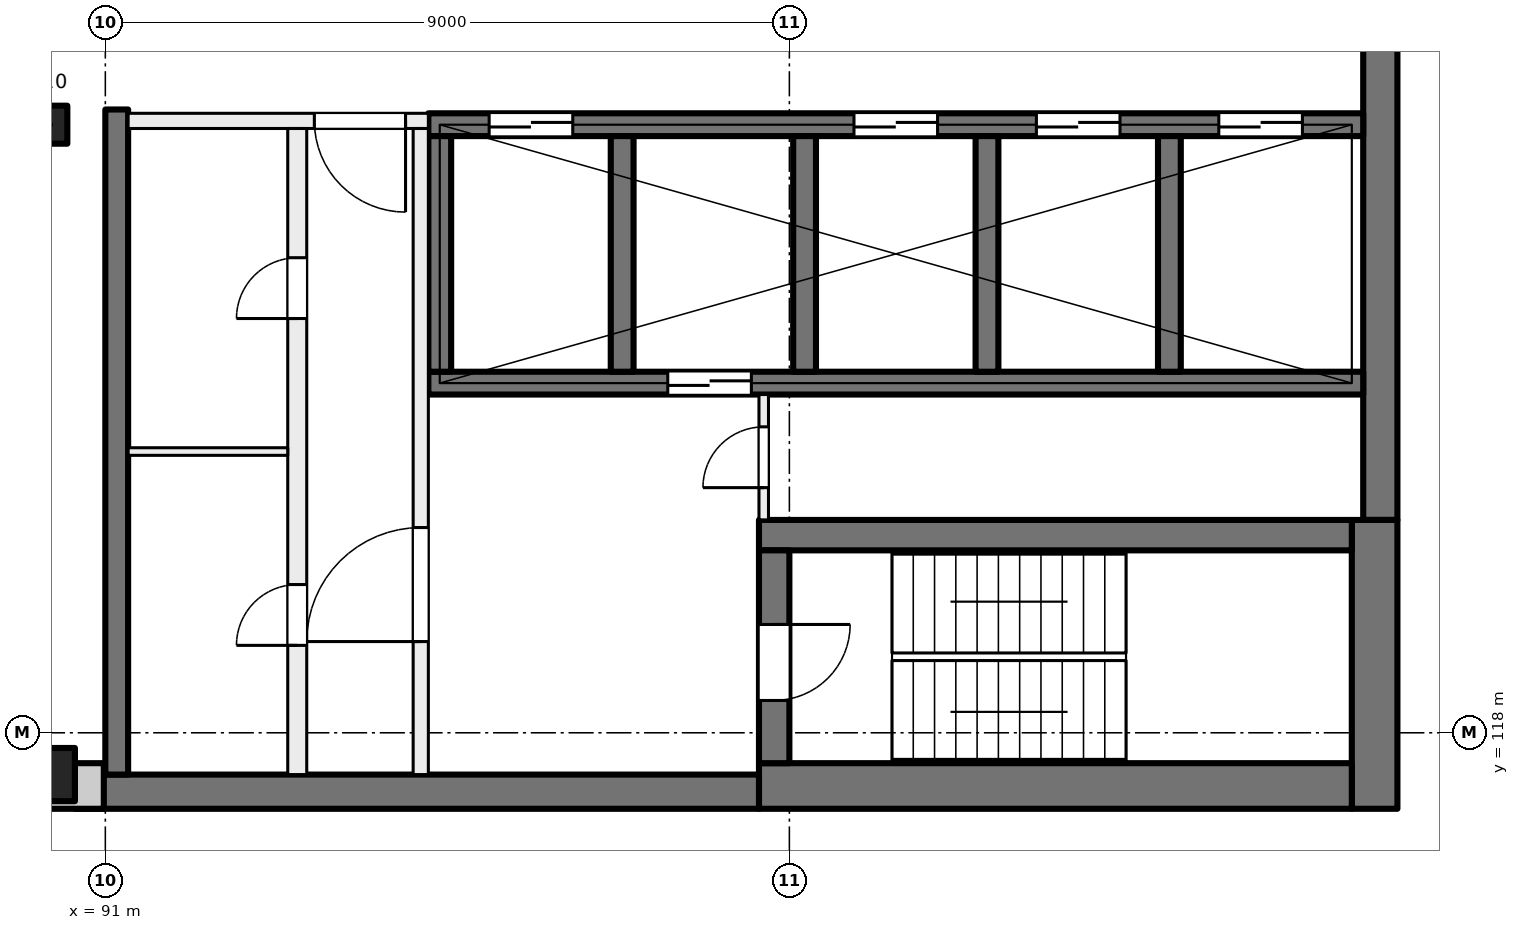
"""IFC4 building model, lengths in metres.
Left out: names, types, materials, properties, quantities, classifications, styles, units other than length and angle.
Written with IfcOpenShell. Run it as: python <this file> out.ifc"""

import sys

from ifc_helpers import new_model, si_unit, direction, frame, frame_2d, origin, origin_2d, place, context, subcontext, project, spatial, rectangle, extrude, element, fill, save


model = new_model("IFC4")
c1 = context("Model", 3, precision=1e-05, world=origin(), true_north=direction((0.0, 1.0)))
c2 = subcontext(c1, "Body", "Model", "MODEL_VIEW")
j1 = project(units=[si_unit("LENGTHUNIT", "METRE"), si_unit("PLANEANGLEUNIT", "RADIAN")], contexts=[c1])
p1 = place(None, origin())
s1 = spatial("IfcSite", under=j1, at=p1, CompositionType="ELEMENT")
p2 = place(p1, origin())
s2 = spatial("IfcBuilding", under=s1, at=p2, CompositionType="ELEMENT")
p3 = place(p2, frame((0.0, 0.0, 269.5)))
s3 = spatial("IfcBuildingStorey", under=s2, at=p3, CompositionType="ELEMENT", Elevation=269.5)
p4 = place(p3, frame((90.25, 126.0, 0.0), z_axis=(0.0, 0.0, 1.0), x_axis=(1.0, 0.0, 0.0)))
e1 = element("IfcColumn", 1, at=p4, inside=s3, PredefinedType="COLUMN", context=c2, shape_type="SweptSolid", body=[
    extrude(rectangle(XDim=0.5, YDim=0.5, at=origin_2d()), origin(), (0.0, 0.0, 1.0), 4.0),
])
p5 = place(p3, frame((90.25, 117.45, 0.0), z_axis=(0.0, 0.0, 1.0), x_axis=(1.0, 0.0, 0.0)))
e2 = element("IfcColumn", 2, at=p5, inside=s3, PredefinedType="COLUMN", context=c2, shape_type="SweptSolid", body=[
    extrude(rectangle(XDim=0.7, YDim=0.7, at=origin_2d()), origin(), (0.0, 0.0, 1.0), 4.0),
])
p6 = place(p3, frame((107.775, 135.2, 0.0), z_axis=(0.0, 0.0, 1.0), x_axis=(0.0, -1.0, 0.0)))
e3 = element("IfcWall", 3, at=p6, inside=s3, PredefinedType="SHEAR", context=c2, shape_type="SweptSolid", body=[
    extrude(rectangle(XDim=14.4, YDim=0.45, at=frame_2d((7.2, 0.0))), origin(), (0.0, 0.0, 1.0), 4.0),
])
p7 = place(p3, frame((107.7, 120.8, 0.0), z_axis=(0.0, 0.0, 1.0), x_axis=(0.0, -1.0, 0.0)))
e4 = element("IfcWall", 4, at=p7, inside=s3, PredefinedType="SHEAR", context=c2, shape_type="SweptSolid", body=[
    extrude(rectangle(XDim=3.8, YDim=0.6, at=frame_2d((1.9, 0.0))), origin(), (0.0, 0.0, 1.0), 4.0),
])
p8 = place(p3, frame((107.4, 117.3, 0.0), z_axis=(0.0, 0.0, 1.0), x_axis=(-1.0, 0.0, 0.0)))
e5 = element("IfcWall", 5, at=p8, inside=s3, PredefinedType="SHEAR", context=c2, shape_type="SweptSolid", body=[
    extrude(rectangle(XDim=7.8, YDim=0.6, at=frame_2d((3.9, 0.0))), origin(), (0.0, 0.0, 1.0), 4.0),
])
p9 = place(p3, frame((99.6, 117.225, 0.0), z_axis=(0.0, 0.0, 1.0), x_axis=(-1.0, 0.0, 0.0)))
e6 = element("IfcWall", 6, at=p9, inside=s3, PredefinedType="SHEAR", context=c2, shape_type="SweptSolid", body=[
    extrude(rectangle(XDim=9.0, YDim=0.45, at=frame_2d((4.5, 0.0))), origin(), (0.0, 0.0, 1.0), 4.0),
])
p10 = place(p3, frame((107.4, 120.6, 0.0), z_axis=(0.0, 0.0, 1.0), x_axis=(-1.0, 0.0, 0.0)))
e7 = element("IfcWall", 7, at=p10, inside=s3, PredefinedType="SHEAR", context=c2, shape_type="SweptSolid", body=[
    extrude(rectangle(XDim=7.8, YDim=0.4, at=frame_2d((3.9, 0.0))), origin(), (0.0, 0.0, 1.0), 4.0),
])
p11 = place(p3, frame((99.8, 120.4, 0.0), z_axis=(0.0, 0.0, 1.0), x_axis=(0.0, -1.0, 0.0)))
e8 = element("IfcWall", 8, at=p11, inside=s3, PredefinedType="SHEAR", context=c2, shape_type="SweptSolid", body=[
    extrude(rectangle(XDim=2.8, YDim=0.4, at=frame_2d((1.4, 0.0))), origin(), (0.0, 0.0, 1.0), 4.0),
])
p12 = place(p11, frame((0.975, 0.0, 0.0)))
e9 = element("IfcOpeningElement", 9, at=p12, cuts=e8, PredefinedType="OPENING", context=c2, shape_type="SweptSolid", body=[
    extrude(rectangle(XDim=1.0, YDim=2.1, at=frame_2d((0.5, 1.05))), frame((0.0, 0.21, 0.0), z_axis=(0.0, -1.0, 0.0), x_axis=(1.0, 0.0, 0.0)), (0.0, 0.0, 1.0), 0.42),
])
p13 = place(p3, frame((107.55, 126.0, 0.0), z_axis=(0.0, 0.0, 1.0), x_axis=(-1.0, 0.0, 0.0)))
e10 = element("IfcWall", 10, at=p13, inside=s3, PredefinedType="SHEAR", context=c2, shape_type="SweptSolid", body=[
    extrude(rectangle(XDim=12.3, YDim=0.3, at=frame_2d((6.15, 0.0))), origin(), (0.0, 0.0, 1.0), 4.0),
])
p14 = place(p13, frame((0.8, 0.0, 0.0)))
e11 = element("IfcOpeningElement", 11, at=p14, cuts=e10, PredefinedType="OPENING", context=c2, shape_type="SweptSolid", body=[
    extrude(rectangle(XDim=1.1, YDim=2.1, at=frame_2d((0.55, 1.05))), frame((0.0, 0.16, 0.0), z_axis=(0.0, -1.0, 0.0), x_axis=(1.0, 0.0, 0.0)), (0.0, 0.0, 1.0), 0.32),
])
p15 = place(p13, frame((3.2, 0.0, 0.0)))
e12 = element("IfcOpeningElement", 12, at=p15, cuts=e10, PredefinedType="OPENING", context=c2, shape_type="SweptSolid", body=[
    extrude(rectangle(XDim=1.1, YDim=2.1, at=frame_2d((0.55, 1.05))), frame((0.0, 0.16, 0.0), z_axis=(0.0, -1.0, 0.0), x_axis=(1.0, 0.0, 0.0)), (0.0, 0.0, 1.0), 0.32),
])
p16 = place(p13, frame((5.6, 0.0, 0.0)))
e13 = element("IfcOpeningElement", 13, at=p16, cuts=e10, PredefinedType="OPENING", context=c2, shape_type="SweptSolid", body=[
    extrude(rectangle(XDim=1.1, YDim=2.1, at=frame_2d((0.55, 1.05))), frame((0.0, 0.16, 0.0), z_axis=(0.0, -1.0, 0.0), x_axis=(1.0, 0.0, 0.0)), (0.0, 0.0, 1.0), 0.32),
])
p17 = place(p13, frame((10.4, 0.0, 0.0)))
e14 = element("IfcOpeningElement", 14, at=p17, cuts=e10, PredefinedType="OPENING", context=c2, shape_type="SweptSolid", body=[
    extrude(rectangle(XDim=1.1, YDim=2.1, at=frame_2d((0.55, 1.05))), frame((0.0, 0.16, 0.0), z_axis=(0.0, -1.0, 0.0), x_axis=(1.0, 0.0, 0.0)), (0.0, 0.0, 1.0), 0.32),
])
p18 = place(p3, frame((107.55, 122.6, 0.0), z_axis=(0.0, 0.0, 1.0), x_axis=(-1.0, 0.0, 0.0)))
e15 = element("IfcWall", 15, at=p18, inside=s3, PredefinedType="SHEAR", context=c2, shape_type="SweptSolid", body=[
    extrude(rectangle(XDim=12.3, YDim=0.3, at=frame_2d((6.15, 0.0))), origin(), (0.0, 0.0, 1.0), 4.0),
])
p19 = place(p18, frame((8.05, 0.0, 0.0)))
e16 = element("IfcOpeningElement", 16, at=p19, cuts=e15, PredefinedType="OPENING", context=c2, shape_type="SweptSolid", body=[
    extrude(rectangle(XDim=1.1, YDim=2.1, at=frame_2d((0.55, 1.05))), frame((0.0, 0.16, 0.0), z_axis=(0.0, -1.0, 0.0), x_axis=(1.0, 0.0, 0.0)), (0.0, 0.0, 1.0), 0.32),
])
for number, where, z_axis, x_axis in (
    (17, (105.0, 125.85, 0.0), (0.0, 0.0, 1.0), (0.0, -1.0, 0.0)),
    (18, (102.6, 125.85, 0.0), (0.0, 0.0, 1.0), (0.0, -1.0, 0.0)),
    (19, (100.2, 125.85, 0.0), (0.0, 0.0, 1.0), (0.0, -1.0, 0.0)),
    (20, (97.8, 125.85, 0.0), (0.0, 0.0, 1.0), (0.0, -1.0, 0.0)),
    (21, (95.4, 125.85, 0.0), (0.0, 0.0, 1.0), (0.0, -1.0, 0.0)),
):
    element("IfcWall", number, at=place(p3, frame(where, z_axis=z_axis, x_axis=x_axis)), inside=s3, PredefinedType="SHEAR", context=c2, shape_type="SweptSolid", body=[
        extrude(rectangle(XDim=3.1, YDim=0.3, at=frame_2d((1.55, 0.0))), origin(), (0.0, 0.0, 1.0), 4.0),
    ])
p20 = place(p3, frame((91.15, 126.2, 0.0), z_axis=(0.0, 0.0, 1.0), x_axis=(0.0, -1.0, 0.0)))
e22 = element("IfcWall", 22, at=p20, inside=s3, PredefinedType="SHEAR", context=c2, shape_type="SweptSolid", body=[
    extrude(rectangle(XDim=8.75, YDim=0.3, at=frame_2d((4.375, 0.0))), origin(), (0.0, 0.0, 1.0), 4.0),
])
p21 = place(p3, frame((90.98, 117.3, 0.0), z_axis=(0.0, 0.0, 1.0), x_axis=(-1.0, 0.0, 0.0)))
e23 = element("IfcWall", 23, at=p21, inside=s3, PredefinedType="SOLIDWALL", context=c2, shape_type="SweptSolid", body=[
    extrude(rectangle(XDim=43.98, YDim=0.6, at=frame_2d((21.99, 0.0))), origin(), (0.0, 0.0, 1.0), 3.625),
])
p22 = place(p21, frame((1.48, 0.0, 0.9)))
e24 = element("IfcOpeningElement", 24, at=p22, cuts=e23, PredefinedType="OPENING", context=c2, shape_type="SweptSolid", body=[
    extrude(rectangle(XDim=3.0, YDim=2.4, at=frame_2d((1.5, 1.2))), frame((0.0, 0.31, 0.0), z_axis=(0.0, -1.0, 0.0), x_axis=(1.0, 0.0, 0.0)), (0.0, 0.0, 1.0), 0.62),
])
p23 = place(p21, frame((5.98, 0.0, 0.9)))
e25 = element("IfcOpeningElement", 25, at=p23, cuts=e23, PredefinedType="OPENING", context=c2, shape_type="SweptSolid", body=[
    extrude(rectangle(XDim=3.0, YDim=2.4, at=frame_2d((1.5, 1.2))), frame((0.0, 0.31, 0.0), z_axis=(0.0, -1.0, 0.0), x_axis=(1.0, 0.0, 0.0)), (0.0, 0.0, 1.0), 0.62),
])
p24 = place(p21, frame((10.48, 0.0, 0.9)))
e26 = element("IfcOpeningElement", 26, at=p24, cuts=e23, PredefinedType="OPENING", context=c2, shape_type="SweptSolid", body=[
    extrude(rectangle(XDim=3.0, YDim=2.4, at=frame_2d((1.5, 1.2))), frame((0.0, 0.31, 0.0), z_axis=(0.0, -1.0, 0.0), x_axis=(1.0, 0.0, 0.0)), (0.0, 0.0, 1.0), 0.62),
])
p25 = place(p21, frame((14.98, 0.0, 0.9)))
e27 = element("IfcOpeningElement", 27, at=p25, cuts=e23, PredefinedType="OPENING", context=c2, shape_type="SweptSolid", body=[
    extrude(rectangle(XDim=3.0, YDim=2.4, at=frame_2d((1.5, 1.2))), frame((0.0, 0.31, 0.0), z_axis=(0.0, -1.0, 0.0), x_axis=(1.0, 0.0, 0.0)), (0.0, 0.0, 1.0), 0.62),
])
p26 = place(p21, frame((19.48, 0.0, 0.9)))
e28 = element("IfcOpeningElement", 28, at=p26, cuts=e23, PredefinedType="OPENING", context=c2, shape_type="SweptSolid", body=[
    extrude(rectangle(XDim=3.0, YDim=2.4, at=frame_2d((1.5, 1.2))), frame((0.0, 0.31, 0.0), z_axis=(0.0, -1.0, 0.0), x_axis=(1.0, 0.0, 0.0)), (0.0, 0.0, 1.0), 0.62),
])
p27 = place(p21, frame((23.98, 0.0, 0.9)))
e29 = element("IfcOpeningElement", 29, at=p27, cuts=e23, PredefinedType="OPENING", context=c2, shape_type="SweptSolid", body=[
    extrude(rectangle(XDim=3.0, YDim=2.4, at=frame_2d((1.5, 1.2))), frame((0.0, 0.31, 0.0), z_axis=(0.0, -1.0, 0.0), x_axis=(1.0, 0.0, 0.0)), (0.0, 0.0, 1.0), 0.62),
])
p28 = place(p21, frame((28.48, 0.0, 0.9)))
e30 = element("IfcOpeningElement", 30, at=p28, cuts=e23, PredefinedType="OPENING", context=c2, shape_type="SweptSolid", body=[
    extrude(rectangle(XDim=3.0, YDim=2.4, at=frame_2d((1.5, 1.2))), frame((0.0, 0.31, 0.0), z_axis=(0.0, -1.0, 0.0), x_axis=(1.0, 0.0, 0.0)), (0.0, 0.0, 1.0), 0.62),
])
p29 = place(p21, frame((32.98, 0.0, 0.9)))
e31 = element("IfcOpeningElement", 31, at=p29, cuts=e23, PredefinedType="OPENING", context=c2, shape_type="SweptSolid", body=[
    extrude(rectangle(XDim=3.0, YDim=2.4, at=frame_2d((1.5, 1.2))), frame((0.0, 0.31, 0.0), z_axis=(0.0, -1.0, 0.0), x_axis=(1.0, 0.0, 0.0)), (0.0, 0.0, 1.0), 0.62),
])
p30 = place(p21, frame((37.48, 0.0, 0.9)))
e32 = element("IfcOpeningElement", 32, at=p30, cuts=e23, PredefinedType="OPENING", context=c2, shape_type="SweptSolid", body=[
    extrude(rectangle(XDim=3.0, YDim=2.4, at=frame_2d((1.5, 1.2))), frame((0.0, 0.31, 0.0), z_axis=(0.0, -1.0, 0.0), x_axis=(1.0, 0.0, 0.0)), (0.0, 0.0, 1.0), 0.62),
])
p31 = place(p3, frame((95.25, 126.05, 0.0), z_axis=(0.0, 0.0, 1.0), x_axis=(-1.0, 0.0, 0.0)))
e33 = element("IfcWall", 33, at=p31, inside=s3, PredefinedType="PARTITIONING", context=c2, shape_type="SweptSolid", body=[
    extrude(rectangle(XDim=3.95, YDim=0.2, at=frame_2d((1.975, 0.0))), origin(), (0.0, 0.0, 1.0), 3.625),
])
p32 = place(p31, frame((0.3, 0.0, 0.0)))
e34 = element("IfcOpeningElement", 34, at=p32, cuts=e33, PredefinedType="OPENING", context=c2, shape_type="SweptSolid", body=[
    extrude(rectangle(XDim=1.2, YDim=2.1, at=frame_2d((0.6, 1.05))), frame((0.0, 0.11, 0.0), z_axis=(0.0, -1.0, 0.0), x_axis=(1.0, 0.0, 0.0)), (0.0, 0.0, 1.0), 0.22),
])
p33 = place(p3, frame((95.15, 117.45, 0.0), z_axis=(0.0, 0.0, 1.0), x_axis=(0.0, 1.0, 0.0)))
e35 = element("IfcWall", 35, at=p33, inside=s3, PredefinedType="PARTITIONING", context=c2, shape_type="SweptSolid", body=[
    extrude(rectangle(XDim=8.5, YDim=0.2, at=frame_2d((4.25, 0.0))), origin(), (0.0, 0.0, 1.0), 3.625),
])
p34 = place(p33, frame((1.75, 0.0, 0.0)))
e36 = element("IfcOpeningElement", 36, at=p34, cuts=e35, PredefinedType="OPENING", context=c2, shape_type="SweptSolid", body=[
    extrude(rectangle(XDim=1.5, YDim=2.1, at=frame_2d((0.75, 1.05))), frame((0.0, 0.11, 0.0), z_axis=(0.0, -1.0, 0.0), x_axis=(1.0, 0.0, 0.0)), (0.0, 0.0, 1.0), 0.22),
])
p35 = place(p3, frame((93.525, 117.45, 0.0), z_axis=(0.0, 0.0, 1.0), x_axis=(0.0, 1.0, 0.0)))
e37 = element("IfcWall", 37, at=p35, inside=s3, PredefinedType="PARTITIONING", context=c2, shape_type="SweptSolid", body=[
    extrude(rectangle(XDim=8.5, YDim=0.25, at=frame_2d((4.25, 0.0))), origin(), (0.0, 0.0, 1.0), 3.625),
])
p36 = place(p35, frame((6.0, 0.0, 0.0)))
e38 = element("IfcOpeningElement", 38, at=p36, cuts=e37, PredefinedType="OPENING", context=c2, shape_type="SweptSolid", body=[
    extrude(rectangle(XDim=0.8, YDim=2.1, at=frame_2d((0.4, 1.05))), frame((0.0, 0.135, 0.0), z_axis=(0.0, -1.0, 0.0), x_axis=(1.0, 0.0, 0.0)), (0.0, 0.0, 1.0), 0.27),
])
p37 = place(p35, frame((1.7, 0.0, 0.0)))
e39 = element("IfcOpeningElement", 39, at=p37, cuts=e37, PredefinedType="OPENING", context=c2, shape_type="SweptSolid", body=[
    extrude(rectangle(XDim=0.8, YDim=2.1, at=frame_2d((0.4, 1.05))), frame((0.0, 0.135, 0.0), z_axis=(0.0, -1.0, 0.0), x_axis=(1.0, 0.0, 0.0)), (0.0, 0.0, 1.0), 0.27),
])
p38 = place(p3, frame((99.663, 120.8, 0.0), z_axis=(0.0, 0.0, 1.0), x_axis=(0.0, 1.0, 0.0)))
e40 = element("IfcWall", 40, at=p38, inside=s3, PredefinedType="PARTITIONING", context=c2, shape_type="SweptSolid", body=[
    extrude(rectangle(XDim=1.65, YDim=0.125, at=frame_2d((0.825, 0.0))), origin(), (0.0, 0.0, 1.0), 3.625),
])
p39 = place(p38, frame((0.425, 0.0, 0.0)))
e41 = element("IfcOpeningElement", 41, at=p39, cuts=e40, PredefinedType="OPENING", context=c2, shape_type="SweptSolid", body=[
    extrude(rectangle(XDim=0.8, YDim=2.1, at=frame_2d((0.4, 1.05))), frame((0.0, 0.073, 0.0), z_axis=(0.0, -1.0, 0.0), x_axis=(1.0, 0.0, 0.0)), (0.0, 0.0, 1.0), 0.145),
])
p40 = place(p3, frame((93.4, 121.7, 0.0), z_axis=(0.0, 0.0, 1.0), x_axis=(-1.0, 0.0, 0.0)))
e42 = element("IfcWall", 42, at=p40, inside=s3, PredefinedType="PARTITIONING", context=c2, shape_type="SweptSolid", body=[
    extrude(rectangle(XDim=2.1, YDim=0.1, at=frame_2d((1.05, 0.0))), origin(), (0.0, 0.0, 1.0), 3.625),
])
p41 = place(p14, origin())
e43 = element("IfcDoor", 43, at=p41, inside=s3, OperationType="DOUBLE_DOOR_SLIDING", PredefinedType="DOOR", context=c2, shape_type="SweptSolid", body=[
    extrude(rectangle(XDim=1.1, YDim=2.1, at=frame_2d((0.55, 1.05))), frame((0.0, 0.025, 0.0), z_axis=(0.0, -1.0, 0.0), x_axis=(1.0, 0.0, 0.0)), (0.0, 0.0, 1.0), 0.05),
])
fill(e11, e43)
p42 = place(p15, origin())
e44 = element("IfcDoor", 44, at=p42, inside=s3, OperationType="DOUBLE_DOOR_SLIDING", PredefinedType="DOOR", context=c2, shape_type="SweptSolid", body=[
    extrude(rectangle(XDim=1.1, YDim=2.1, at=frame_2d((0.55, 1.05))), frame((0.0, 0.025, 0.0), z_axis=(0.0, -1.0, 0.0), x_axis=(1.0, 0.0, 0.0)), (0.0, 0.0, 1.0), 0.05),
])
fill(e12, e44)
p43 = place(p16, origin())
e45 = element("IfcDoor", 45, at=p43, inside=s3, OperationType="DOUBLE_DOOR_SLIDING", PredefinedType="DOOR", context=c2, shape_type="SweptSolid", body=[
    extrude(rectangle(XDim=1.1, YDim=2.1, at=frame_2d((0.55, 1.05))), frame((0.0, 0.025, 0.0), z_axis=(0.0, -1.0, 0.0), x_axis=(1.0, 0.0, 0.0)), (0.0, 0.0, 1.0), 0.05),
])
fill(e13, e45)
p44 = place(p17, origin())
e46 = element("IfcDoor", 46, at=p44, inside=s3, OperationType="DOUBLE_DOOR_SLIDING", PredefinedType="DOOR", context=c2, shape_type="SweptSolid", body=[
    extrude(rectangle(XDim=1.1, YDim=2.1, at=frame_2d((0.55, 1.05))), frame((0.0, 0.025, 0.0), z_axis=(0.0, -1.0, 0.0), x_axis=(1.0, 0.0, 0.0)), (0.0, 0.0, 1.0), 0.05),
])
fill(e14, e46)
p45 = place(p32, origin())
e47 = element("IfcDoor", 47, at=p45, inside=s3, OperationType="DOUBLE_DOOR_SINGLE_SWING", PredefinedType="DOOR", context=c2, shape_type="SweptSolid", body=[
    extrude(rectangle(XDim=1.2, YDim=2.1, at=frame_2d((0.6, 1.05))), frame((0.0, 0.025, 0.0), z_axis=(0.0, -1.0, 0.0), x_axis=(1.0, 0.0, 0.0)), (0.0, 0.0, 1.0), 0.05),
])
fill(e34, e47)
p46 = place(p34, origin())
e48 = element("IfcDoor", 48, at=p46, inside=s3, OperationType="DOUBLE_DOOR_SINGLE_SWING", PredefinedType="DOOR", context=c2, shape_type="SweptSolid", body=[
    extrude(rectangle(XDim=1.5, YDim=2.1, at=frame_2d((0.75, 1.05))), frame((0.0, 0.025, 0.0), z_axis=(0.0, -1.0, 0.0), x_axis=(1.0, 0.0, 0.0)), (0.0, 0.0, 1.0), 0.05),
])
fill(e36, e48)
p47 = place(p12, origin())
e49 = element("IfcDoor", 49, at=p47, inside=s3, OperationType="SINGLE_SWING_LEFT", PredefinedType="DOOR", context=c2, shape_type="SweptSolid", body=[
    extrude(rectangle(XDim=1.0, YDim=2.1, at=frame_2d((0.5, 1.05))), frame((0.0, 0.025, 0.0), z_axis=(0.0, -1.0, 0.0), x_axis=(1.0, 0.0, 0.0)), (0.0, 0.0, 1.0), 0.05),
])
fill(e9, e49)
p48 = place(p39, origin())
e50 = element("IfcDoor", 50, at=p48, inside=s3, OperationType="SINGLE_SWING_RIGHT", PredefinedType="DOOR", context=c2, shape_type="SweptSolid", body=[
    extrude(rectangle(XDim=0.8, YDim=2.1, at=frame_2d((0.4, 1.05))), frame((0.0, 0.025, 0.0), z_axis=(0.0, -1.0, 0.0), x_axis=(1.0, 0.0, 0.0)), (0.0, 0.0, 1.0), 0.05),
])
fill(e41, e50)
p49 = place(p36, origin())
e51 = element("IfcDoor", 51, at=p49, inside=s3, OperationType="SINGLE_SWING_LEFT", PredefinedType="DOOR", context=c2, shape_type="SweptSolid", body=[
    extrude(rectangle(XDim=0.8, YDim=2.1, at=frame_2d((0.4, 1.05))), frame((0.0, 0.025, 0.0), z_axis=(0.0, -1.0, 0.0), x_axis=(1.0, 0.0, 0.0)), (0.0, 0.0, 1.0), 0.05),
])
fill(e38, e51)
p50 = place(p37, origin())
e52 = element("IfcDoor", 52, at=p50, inside=s3, OperationType="SINGLE_SWING_RIGHT", PredefinedType="DOOR", context=c2, shape_type="SweptSolid", body=[
    extrude(rectangle(XDim=0.8, YDim=2.1, at=frame_2d((0.4, 1.05))), frame((0.0, 0.025, 0.0), z_axis=(0.0, -1.0, 0.0), x_axis=(1.0, 0.0, 0.0)), (0.0, 0.0, 1.0), 0.05),
])
fill(e39, e52)
p51 = place(p19, origin())
e53 = element("IfcDoor", 53, at=p51, inside=s3, OperationType="DOUBLE_DOOR_SLIDING", PredefinedType="DOOR", context=c2, shape_type="SweptSolid", body=[
    extrude(rectangle(XDim=1.1, YDim=2.1, at=frame_2d((0.55, 1.05))), frame((0.0, 0.025, 0.0), z_axis=(0.0, -1.0, 0.0), x_axis=(1.0, 0.0, 0.0)), (0.0, 0.0, 1.0), 0.05),
])
fill(e16, e53)
save(model, sys.argv[1])
